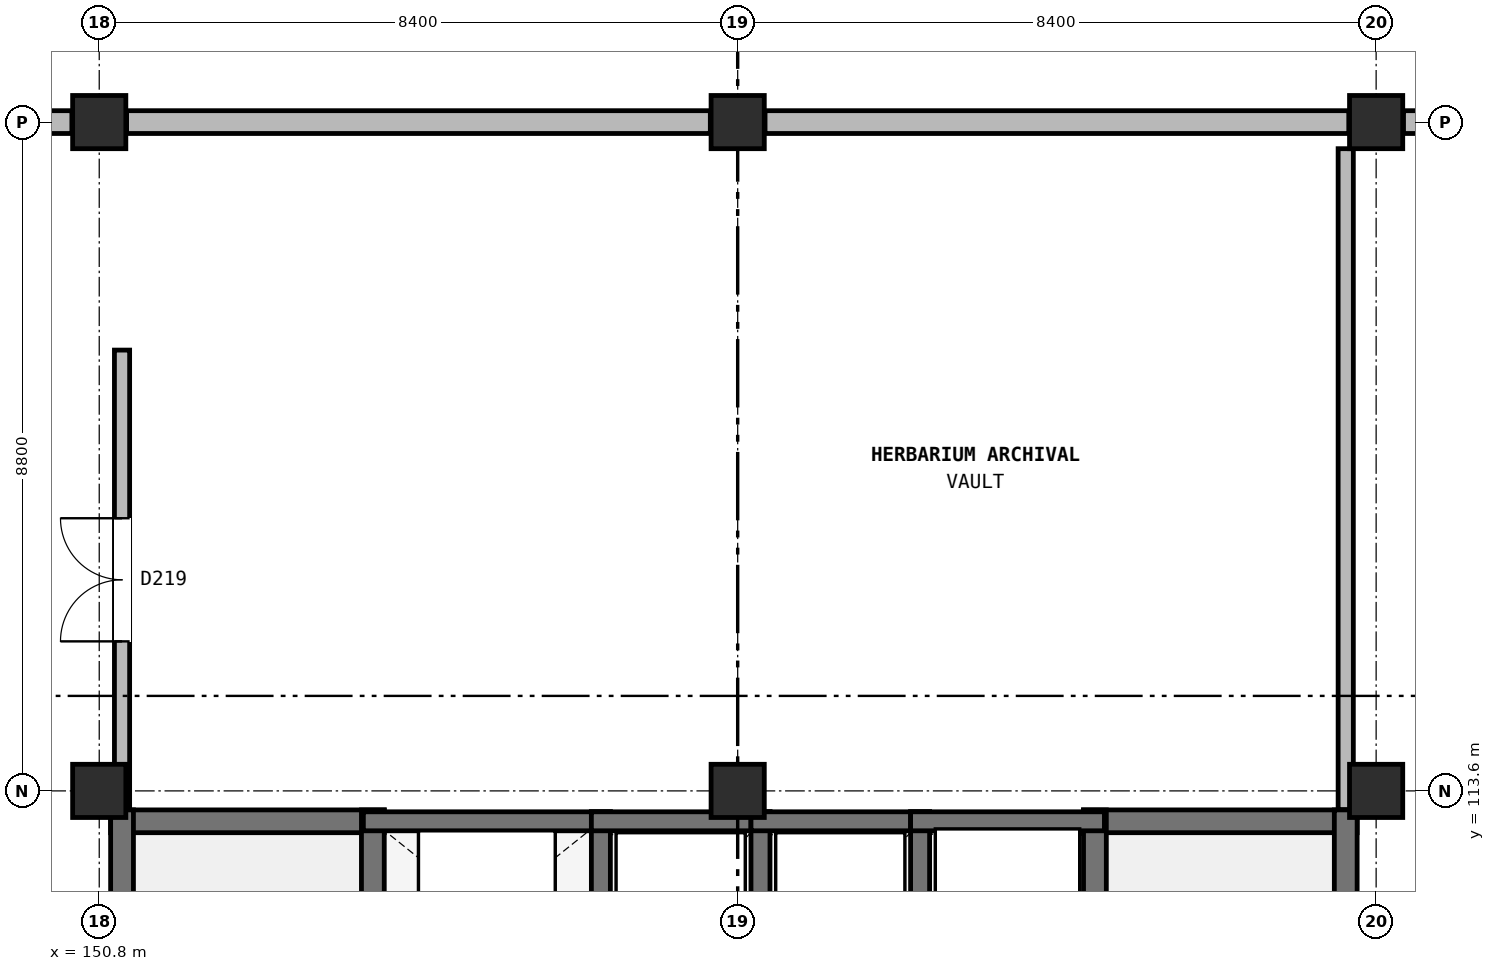
"""IFC4 building model, lengths in metres.
Left out: names, types, materials, properties, quantities, classifications, styles, units other than length and angle.
Written with IfcOpenShell. Run it as: python <this file> out.ifc"""

import sys

from ifc_helpers import new_model, si_unit, direction, frame, frame_2d, origin, origin_2d, place, context, subcontext, project, spatial, rectangle, extrude, element, fill, save


model = new_model("IFC4")
c1 = context("Model", 3, precision=1e-05, world=origin(), true_north=direction((0.0, 1.0)))
c2 = subcontext(c1, "Body", "Model", "MODEL_VIEW")
j1 = project(units=[si_unit("LENGTHUNIT", "METRE"), si_unit("PLANEANGLEUNIT", "RADIAN")], contexts=[c1])
p1 = place(None, origin())
s1 = spatial("IfcSite", under=j1, at=p1, CompositionType="ELEMENT")
p2 = place(p1, origin())
s2 = spatial("IfcBuilding", under=s1, at=p2, CompositionType="ELEMENT")
p3 = place(p2, frame((0.0, 0.0, 24.8)))
s3 = spatial("IfcBuildingStorey", under=s2, at=p3, CompositionType="ELEMENT", Elevation=24.8)
for number, where, z_axis, x_axis in (
    (1, (150.8, 113.6, 0.0), (0.0, 0.0, 1.0), (1.0, 0.0, 0.0)),
    (2, (150.8, 122.4, 0.0), (0.0, 0.0, 1.0), (1.0, 0.0, 0.0)),
    (3, (159.2, 113.6, 0.0), (0.0, 0.0, 1.0), (1.0, 0.0, 0.0)),
    (4, (159.2, 122.4, 0.0), (0.0, 0.0, 1.0), (1.0, 0.0, 0.0)),
    (5, (167.6, 113.6, 0.0), (0.0, 0.0, 1.0), (1.0, 0.0, 0.0)),
    (6, (167.6, 122.4, 0.0), (0.0, 0.0, 1.0), (1.0, 0.0, 0.0)),
):
    element("IfcColumn", number, at=place(p3, frame(where, z_axis=z_axis, x_axis=x_axis)), inside=s3, PredefinedType="COLUMN", context=c2, shape_type="SweptSolid", body=[
        extrude(rectangle(XDim=0.7, YDim=0.7, at=origin_2d()), origin(), (0.0, 0.0, 1.0), 4.0),
    ])
p4 = place(p3, frame((175.64, 122.4, 0.0), z_axis=(0.0, 0.0, 1.0), x_axis=(-1.0, 0.0, 0.0)))
e7 = element("IfcWall", 7, at=p4, inside=s3, PredefinedType="SOLIDWALL", context=c2, shape_type="SweptSolid", body=[
    extrude(rectangle(XDim=7.68, YDim=0.3, at=frame_2d((3.84, 0.0))), origin(), (0.0, 0.0, 1.0), 3.15),
])
p5 = place(p4, frame((1.36, 0.0, 0.9)))
e8 = element("IfcOpeningElement", 8, at=p5, cuts=e7, PredefinedType="OPENING", context=c2, shape_type="SweptSolid", body=[
    extrude(rectangle(XDim=1.32, YDim=1.78, at=frame_2d((0.66, 0.89))), frame((0.0, 0.16, 0.0), z_axis=(0.0, -1.0, 0.0), x_axis=(1.0, 0.0, 0.0)), (0.0, 0.0, 1.0), 0.32),
])
p6 = place(p3, frame((167.24, 122.4, 0.0), z_axis=(0.0, 0.0, 1.0), x_axis=(-1.0, 0.0, 0.0)))
e9 = element("IfcWall", 9, at=p6, inside=s3, PredefinedType="SOLIDWALL", context=c2, shape_type="SweptSolid", body=[
    extrude(rectangle(XDim=7.68, YDim=0.3, at=frame_2d((3.84, 0.0))), origin(), (0.0, 0.0, 1.0), 3.15),
])
p7 = place(p3, frame((158.84, 122.4, 0.0), z_axis=(0.0, 0.0, 1.0), x_axis=(-1.0, 0.0, 0.0)))
e10 = element("IfcWall", 10, at=p7, inside=s3, PredefinedType="SOLIDWALL", context=c2, shape_type="SweptSolid", body=[
    extrude(rectangle(XDim=7.68, YDim=0.3, at=frame_2d((3.84, 0.0))), origin(), (0.0, 0.0, 1.0), 3.15),
])
p8 = place(p3, frame((150.44, 122.4, 0.0), z_axis=(0.0, 0.0, 1.0), x_axis=(-1.0, 0.0, 0.0)))
e11 = element("IfcWall", 11, at=p8, inside=s3, PredefinedType="SOLIDWALL", context=c2, shape_type="SweptSolid", body=[
    extrude(rectangle(XDim=7.68, YDim=0.3, at=frame_2d((3.84, 0.0))), origin(), (0.0, 0.0, 1.0), 3.15),
])
p9 = place(p3, frame((150.95, 113.2, 0.0), z_axis=(0.0, 0.0, 1.0), x_axis=(1.0, 0.0, 0.0)))
e12 = element("IfcWall", 12, at=p9, inside=s3, PredefinedType="SHEAR", context=c2, shape_type="SweptSolid", body=[
    extrude(rectangle(XDim=3.6, YDim=0.3, at=frame_2d((1.8, 0.0))), origin(), (0.0, 0.0, 1.0), 4.0),
])
p10 = place(p3, frame((151.1, 105.05, 0.0), z_axis=(0.0, 0.0, 1.0), x_axis=(0.0, 1.0, 0.0)))
e13 = element("IfcWall", 13, at=p10, inside=s3, PredefinedType="SHEAR", context=c2, shape_type="SweptSolid", body=[
    extrude(rectangle(XDim=8.3, YDim=0.3, at=frame_2d((4.15, 0.0))), origin(), (0.0, 0.0, 1.0), 4.0),
])
p11 = place(p3, frame((154.4, 105.05, 0.0), z_axis=(0.0, 0.0, 1.0), x_axis=(0.0, 1.0, 0.0)))
e14 = element("IfcWall", 14, at=p11, inside=s3, PredefinedType="SHEAR", context=c2, shape_type="SweptSolid", body=[
    extrude(rectangle(XDim=8.3, YDim=0.3, at=frame_2d((4.15, 0.0))), origin(), (0.0, 0.0, 1.0), 4.0),
])
p12 = place(p11, frame((0.45, 0.0, 0.0)))
e15 = element("IfcOpeningElement", 15, at=p12, cuts=e14, PredefinedType="OPENING", context=c2, shape_type="SweptSolid", body=[
    extrude(rectangle(XDim=1.1, YDim=2.2, at=frame_2d((0.55, 1.1))), frame((0.0, 0.16, 0.0), z_axis=(0.0, -1.0, 0.0), x_axis=(1.0, 0.0, 0.0)), (0.0, 0.0, 1.0), 0.32),
])
p13 = place(p3, frame((163.75, 113.2, 0.0), z_axis=(0.0, 0.0, 1.0), x_axis=(1.0, 0.0, 0.0)))
e16 = element("IfcWall", 16, at=p13, inside=s3, PredefinedType="SHEAR", context=c2, shape_type="SweptSolid", body=[
    extrude(rectangle(XDim=3.6, YDim=0.3, at=frame_2d((1.8, 0.0))), origin(), (0.0, 0.0, 1.0), 4.0),
])
for number, where, z_axis, x_axis in (
    (17, (163.9, 105.05, 0.0), (0.0, 0.0, 1.0), (0.0, 1.0, 0.0)),
    (18, (167.2, 105.05, 0.0), (0.0, 0.0, 1.0), (0.0, 1.0, 0.0)),
):
    element("IfcWall", number, at=place(p3, frame(where, z_axis=z_axis, x_axis=x_axis)), inside=s3, PredefinedType="SHEAR", context=c2, shape_type="SweptSolid", body=[
        extrude(rectangle(XDim=8.3, YDim=0.3, at=frame_2d((4.15, 0.0))), origin(), (0.0, 0.0, 1.0), 4.0),
    ])
p14 = place(p3, frame((154.275, 113.2, 0.0), z_axis=(0.0, 0.0, 1.0), x_axis=(1.0, 0.0, 0.0)))
e19 = element("IfcWall", 19, at=p14, inside=s3, PredefinedType="SOLIDWALL", context=c2, shape_type="SweptSolid", body=[
    extrude(rectangle(XDim=3.25, YDim=0.25, at=frame_2d((1.625, 0.0))), origin(), (0.0, 0.0, 1.0), 3.68),
])
p15 = place(p3, frame((157.4, 110.675, 0.0), z_axis=(0.0, 0.0, 1.0), x_axis=(0.0, 1.0, 0.0)))
e20 = element("IfcWall", 20, at=p15, inside=s3, PredefinedType="SOLIDWALL", context=c2, shape_type="SweptSolid", body=[
    extrude(rectangle(XDim=2.65, YDim=0.25, at=frame_2d((1.325, 0.0))), origin(), (0.0, 0.0, 1.0), 3.68),
])
p16 = place(p3, frame((157.275, 113.2, 0.0), z_axis=(0.0, 0.0, 1.0), x_axis=(1.0, 0.0, 0.0)))
e21 = element("IfcWall", 21, at=p16, inside=s3, PredefinedType="SOLIDWALL", context=c2, shape_type="SweptSolid", body=[
    extrude(rectangle(XDim=2.35, YDim=0.25, at=frame_2d((1.175, 0.0))), origin(), (0.0, 0.0, 1.0), 3.68),
])
p17 = place(p3, frame((159.5, 110.675, 0.0), z_axis=(0.0, 0.0, 1.0), x_axis=(0.0, 1.0, 0.0)))
e22 = element("IfcWall", 22, at=p17, inside=s3, PredefinedType="SOLIDWALL", context=c2, shape_type="SweptSolid", body=[
    extrude(rectangle(XDim=2.65, YDim=0.25, at=frame_2d((1.325, 0.0))), origin(), (0.0, 0.0, 1.0), 3.68),
])
p18 = place(p3, frame((159.375, 113.2, 0.0), z_axis=(0.0, 0.0, 1.0), x_axis=(1.0, 0.0, 0.0)))
e23 = element("IfcWall", 23, at=p18, inside=s3, PredefinedType="SOLIDWALL", context=c2, shape_type="SweptSolid", body=[
    extrude(rectangle(XDim=2.35, YDim=0.25, at=frame_2d((1.175, 0.0))), origin(), (0.0, 0.0, 1.0), 3.68),
])
p19 = place(p3, frame((161.6, 110.675, 0.0), z_axis=(0.0, 0.0, 1.0), x_axis=(0.0, 1.0, 0.0)))
e24 = element("IfcWall", 24, at=p19, inside=s3, PredefinedType="SOLIDWALL", context=c2, shape_type="SweptSolid", body=[
    extrude(rectangle(XDim=2.65, YDim=0.25, at=frame_2d((1.325, 0.0))), origin(), (0.0, 0.0, 1.0), 3.68),
])
p20 = place(p3, frame((161.475, 113.2, 0.0), z_axis=(0.0, 0.0, 1.0), x_axis=(1.0, 0.0, 0.0)))
e25 = element("IfcWall", 25, at=p20, inside=s3, PredefinedType="SOLIDWALL", context=c2, shape_type="SweptSolid", body=[
    extrude(rectangle(XDim=2.55, YDim=0.25, at=frame_2d((1.275, 0.0))), origin(), (0.0, 0.0, 1.0), 3.68),
])
p21 = place(p3, frame((151.1, 113.355, 0.0), z_axis=(0.0, 0.0, 1.0), x_axis=(0.0, 1.0, 0.0)))
e26 = element("IfcWall", 26, at=p21, inside=s3, PredefinedType="PARTITIONING", context=c2, shape_type="SweptSolid", body=[
    extrude(rectangle(XDim=6.045, YDim=0.2, at=frame_2d((3.022, 0.0))), origin(), (0.0, 0.0, 1.0), 3.145),
])
p22 = place(p21, frame((2.212, 0.0, 0.0)))
e27 = element("IfcOpeningElement", 27, at=p22, cuts=e26, PredefinedType="OPENING", context=c2, shape_type="SweptSolid", body=[
    extrude(rectangle(XDim=1.62, YDim=2.25, at=frame_2d((0.81, 1.125))), frame((0.0, 0.11, 0.0), z_axis=(0.0, -1.0, 0.0), x_axis=(1.0, 0.0, 0.0)), (0.0, 0.0, 1.0), 0.22),
])
p23 = place(p3, frame((167.2, 113.355, 0.0), z_axis=(0.0, 0.0, 1.0), x_axis=(0.0, 1.0, 0.0)))
e28 = element("IfcWall", 28, at=p23, inside=s3, PredefinedType="PARTITIONING", context=c2, shape_type="SweptSolid", body=[
    extrude(rectangle(XDim=8.695, YDim=0.2, at=frame_2d((4.348, 0.0))), origin(), (0.0, 0.0, 1.0), 3.145),
])
p24 = place(p22, origin())
e29 = element("IfcDoor", 29, at=p24, inside=s3, OperationType="DOUBLE_DOOR_SINGLE_SWING", PredefinedType="DOOR", context=c2, shape_type="SweptSolid", body=[
    extrude(rectangle(XDim=1.62, YDim=2.25, at=frame_2d((0.81, 1.125))), frame((0.0, 0.025, 0.0), z_axis=(0.0, -1.0, 0.0), x_axis=(1.0, 0.0, 0.0)), (0.0, 0.0, 1.0), 0.05),
])
fill(e27, e29)
save(model, sys.argv[1])
